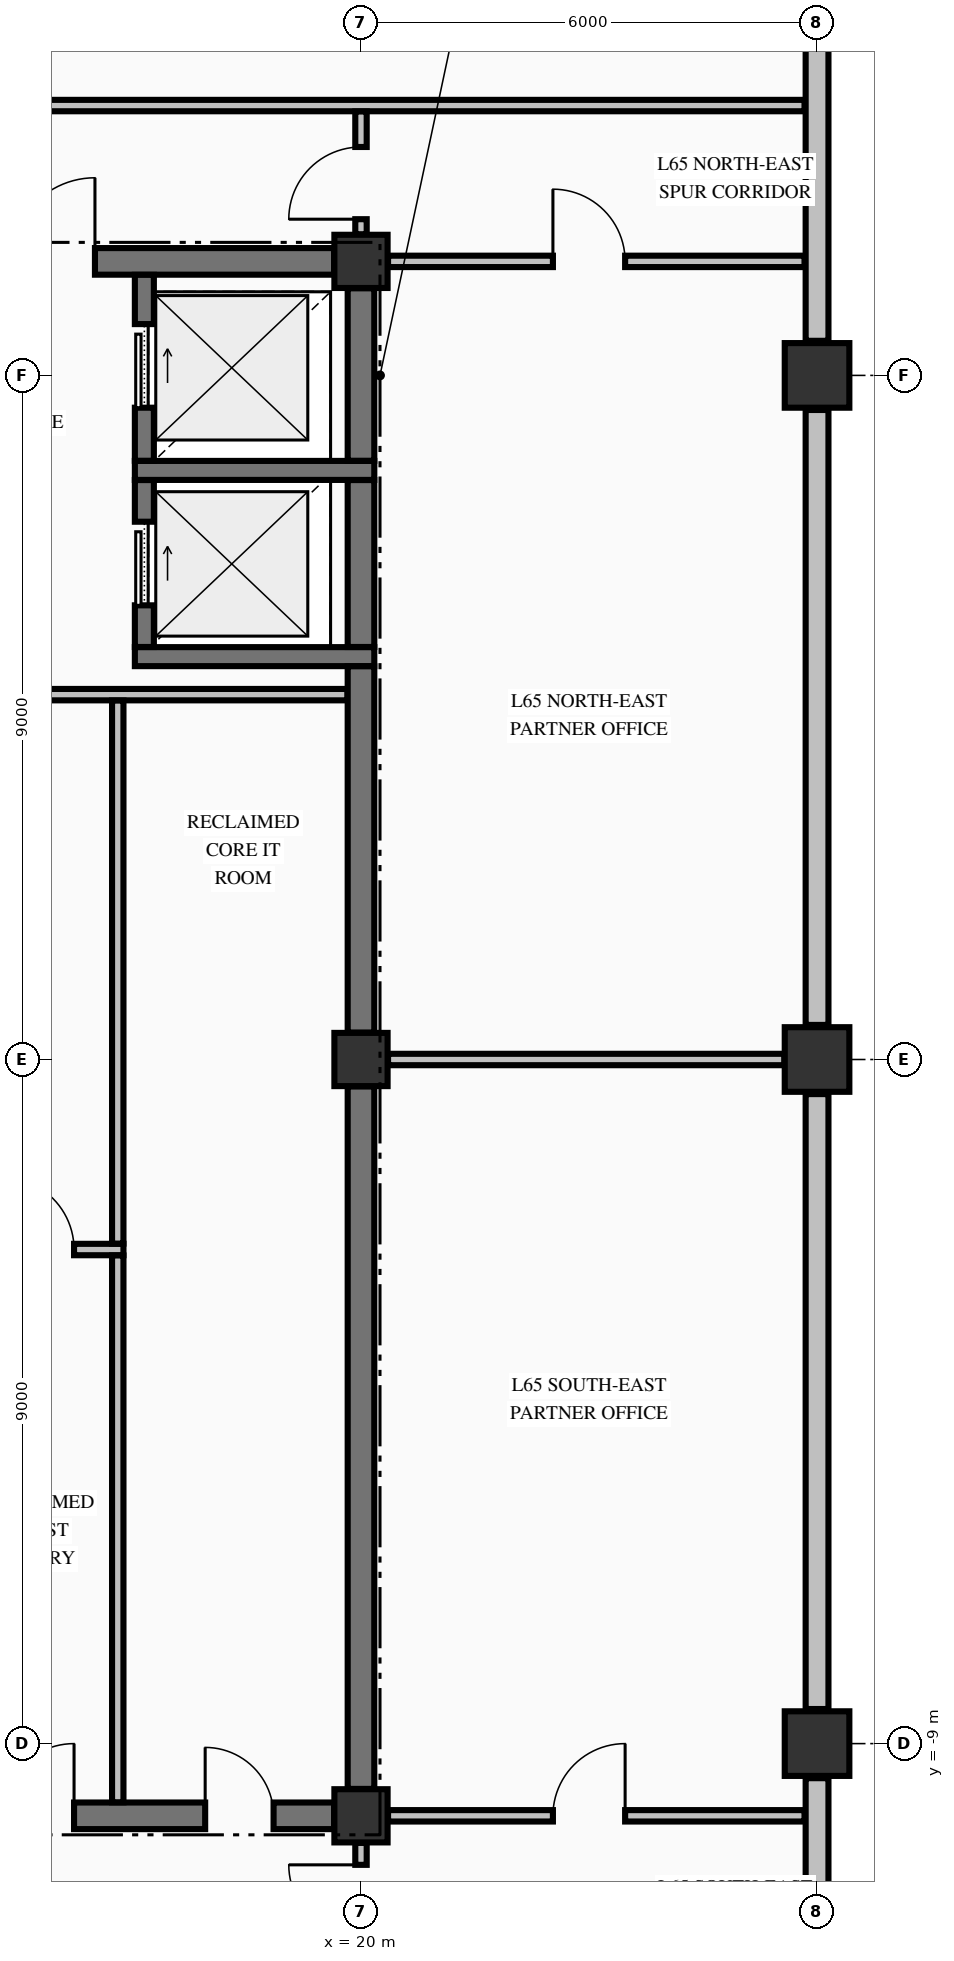
"""IFC4 building model, lengths in metres.
Left out: names, types, materials, properties, quantities, classifications, styles, units other than length and angle.
Written with IfcOpenShell. Run it as: python <this file> out.ifc"""

import sys

from ifc_helpers import new_model, si_unit, direction, frame, frame_2d, origin, origin_2d, place, context, subcontext, project, spatial, rectangle, extrude, element, fill, save


model = new_model("IFC4")
c1 = context("Model", 3, precision=1e-05, world=origin(), true_north=direction((0.0, 1.0)))
c2 = subcontext(c1, "Body", "Model", "MODEL_VIEW")
j1 = project(units=[si_unit("LENGTHUNIT", "METRE"), si_unit("PLANEANGLEUNIT", "RADIAN")], contexts=[c1])
p1 = place(None, origin())
s1 = spatial("IfcSite", under=j1, at=p1, CompositionType="ELEMENT")
p2 = place(p1, origin())
s2 = spatial("IfcBuilding", under=s1, at=p2, CompositionType="ELEMENT")
p3 = place(p2, frame((0.0, 0.0, 246.2)))
s3 = spatial("IfcBuildingStorey", under=s2, at=p3, CompositionType="ELEMENT", Elevation=246.2)
for number, where, z_axis, x_axis in (
    (1, (26.0, -9.0, -0.25), (0.0, 0.0, 1.0), (1.0, 0.0, 0.0)),
    (2, (26.0, 0.0, -0.25), (0.0, 0.0, 1.0), (1.0, 0.0, 0.0)),
    (3, (26.0, 9.0, -0.25), (0.0, 0.0, 1.0), (1.0, 0.0, 0.0)),
):
    element("IfcColumn", number, at=place(p3, frame(where, z_axis=z_axis, x_axis=x_axis)), inside=s3, PredefinedType="COLUMN", context=c2, shape_type="SweptSolid", body=[
        extrude(rectangle(XDim=0.85, YDim=0.85, at=origin_2d()), origin(), (0.0, 0.0, 1.0), 3.055),
    ])
for number, where, z_axis, x_axis in (
    (4, (20.0, -9.95, -0.25), (0.0, 0.0, 1.0), (1.0, 0.0, 0.0)),
    (5, (20.0, 10.5, -0.25), (0.0, 0.0, 1.0), (1.0, 0.0, 0.0)),
    (6, (20.0, 0.0, -0.25), (0.0, 0.0, 1.0), (1.0, 0.0, 0.0)),
):
    element("IfcColumn", number, at=place(p3, frame(where, z_axis=z_axis, x_axis=x_axis)), inside=s3, PredefinedType="COLUMN", context=c2, shape_type="SweptSolid", body=[
        extrude(rectangle(XDim=0.7, YDim=0.7, at=origin_2d()), origin(), (0.0, 0.0, 1.0), 3.055),
    ])
for number, where, z_axis, x_axis in (
    (7, (26.0, -17.545, 0.0), (0.0, 0.0, 1.0), (0.0, 1.0, 0.0)),
    (8, (26.0, -8.545, 0.0), (0.0, 0.0, 1.0), (0.0, 1.0, 0.0)),
    (9, (26.0, 0.455, 0.0), (0.0, 0.0, 1.0), (0.0, 1.0, 0.0)),
    (10, (26.0, 9.455, 0.0), (0.0, 0.0, 1.0), (0.0, 1.0, 0.0)),
):
    element("IfcWall", number, at=place(p3, frame(where, z_axis=z_axis, x_axis=x_axis)), inside=s3, PredefinedType="STANDARD", context=c2, shape_type="SweptSolid", body=[
        extrude(rectangle(XDim=8.09, YDim=0.3, at=frame_2d((4.045, 0.0))), origin(), (0.0, 0.0, 1.0), 2.197),
    ])
p4 = place(p3, frame((14.7, -9.95, 0.0), z_axis=(0.0, 0.0, 1.0), x_axis=(1.0, 0.0, 0.0)))
e11 = element("IfcWall", 11, at=p4, inside=s3, PredefinedType="SHEAR", context=c2, shape_type="SweptSolid", body=[
    extrude(rectangle(XDim=4.946, YDim=0.35, at=frame_2d((2.473, 0.0))), origin(), (0.0, 0.0, 1.0), 2.805),
])
p5 = place(p4, frame((3.25, 0.0, 0.0)))
e12 = element("IfcOpeningElement", 12, at=p5, cuts=e11, PredefinedType="OPENING", context=c2, shape_type="SweptSolid", body=[
    extrude(rectangle(XDim=0.9, YDim=2.15, at=frame_2d((0.45, 1.075))), frame((0.0, 0.185, 0.0), z_axis=(0.0, -1.0, 0.0), x_axis=(1.0, 0.0, 0.0)), (0.0, 0.0, 1.0), 0.37),
])
p6 = place(p4, frame((0.575, 0.0, 0.0)))
e13 = element("IfcOpeningElement", 13, at=p6, cuts=e11, PredefinedType="OPENING", context=c2, shape_type="SweptSolid", body=[
    extrude(rectangle(XDim=0.95, YDim=2.15, at=frame_2d((0.475, 1.075))), frame((0.0, 0.185, 0.0), z_axis=(0.0, -1.0, 0.0), x_axis=(1.0, 0.0, 0.0)), (0.0, 0.0, 1.0), 0.37),
])
for number, where, z_axis, x_axis in (
    (14, (17.025, 5.3, 0.0), (0.0, 0.0, 1.0), (1.0, 0.0, 0.0)),
    (15, (17.025, 7.75, 0.0), (0.0, 0.0, 1.0), (1.0, 0.0, 0.0)),
):
    element("IfcWall", number, at=place(p3, frame(where, z_axis=z_axis, x_axis=x_axis)), inside=s3, PredefinedType="SOLIDWALL", context=c2, shape_type="SweptSolid", body=[
        extrude(rectangle(XDim=3.15, YDim=0.25, at=frame_2d((1.575, 0.0))), origin(), (0.0, 0.0, 1.0), 2.805),
    ])
p7 = place(p3, frame((14.7, 10.5, 0.0), z_axis=(0.0, 0.0, 1.0), x_axis=(1.0, 0.0, 0.0)))
e16 = element("IfcWall", 16, at=p7, inside=s3, PredefinedType="SHEAR", context=c2, shape_type="SweptSolid", body=[
    extrude(rectangle(XDim=4.946, YDim=0.35, at=frame_2d((2.473, 0.0))), origin(), (0.0, 0.0, 1.0), 2.805),
])
p8 = place(p7, frame((0.7, 0.0, 0.0)))
e17 = element("IfcOpeningElement", 17, at=p8, cuts=e16, PredefinedType="OPENING", context=c2, shape_type="SweptSolid", body=[
    extrude(rectangle(XDim=1.1, YDim=2.15, at=frame_2d((0.55, 1.075))), frame((0.0, 0.185, 0.0), z_axis=(0.0, -1.0, 0.0), x_axis=(1.0, 0.0, 0.0)), (0.0, 0.0, 1.0), 0.37),
])
p9 = place(p3, frame((20.356, -9.95, 0.0), z_axis=(0.0, 0.0, 1.0), x_axis=(1.0, 0.0, 0.0)))
e18 = element("IfcWall", 18, at=p9, inside=s3, PredefinedType="PARTITIONING", context=c2, shape_type="SweptSolid", body=[
    extrude(rectangle(XDim=5.479, YDim=0.15, at=frame_2d((2.74, 0.0))), origin(), (0.0, 0.0, 1.0), 2.805),
])
p10 = place(p9, frame((2.169, 0.0, 0.0)))
e19 = element("IfcOpeningElement", 19, at=p10, cuts=e18, PredefinedType="OPENING", context=c2, shape_type="SweptSolid", body=[
    extrude(rectangle(XDim=0.95, YDim=2.15, at=frame_2d((0.475, 1.075))), frame((0.0, 0.085, 0.0), z_axis=(0.0, -1.0, 0.0), x_axis=(1.0, 0.0, 0.0)), (0.0, 0.0, 1.0), 0.17),
])
p11 = place(p3, frame((14.878, -2.5, 0.0), z_axis=(0.0, 0.0, 1.0), x_axis=(1.0, 0.0, 0.0)))
e20 = element("IfcWall", 20, at=p11, inside=s3, PredefinedType="PARTITIONING", context=c2, shape_type="SweptSolid", body=[
    extrude(rectangle(XDim=1.997, YDim=0.15, at=frame_2d((0.999, 0.0))), origin(), (0.0, 0.0, 1.0), 2.805),
])
p12 = place(p11, frame((0.397, 0.0, 0.0)))
e21 = element("IfcOpeningElement", 21, at=p12, cuts=e20, PredefinedType="OPENING", context=c2, shape_type="SweptSolid", body=[
    extrude(rectangle(XDim=0.95, YDim=2.15, at=frame_2d((0.475, 1.075))), frame((0.0, 0.085, 0.0), z_axis=(0.0, -1.0, 0.0), x_axis=(1.0, 0.0, 0.0)), (0.0, 0.0, 1.0), 0.17),
])
p13 = place(p3, frame((20.356, 0.0, 0.0), z_axis=(0.0, 0.0, 1.0), x_axis=(1.0, 0.0, 0.0)))
e22 = element("IfcWall", 22, at=p13, inside=s3, PredefinedType="PARTITIONING", context=c2, shape_type="SweptSolid", body=[
    extrude(rectangle(XDim=5.213, YDim=0.15, at=frame_2d((2.606, 0.0))), origin(), (0.0, 0.0, 1.0), 2.395),
])
p14 = place(p3, frame((14.878, 4.8, 0.0), z_axis=(0.0, 0.0, 1.0), x_axis=(1.0, 0.0, 0.0)))
e23 = element("IfcWall", 23, at=p14, inside=s3, PredefinedType="PARTITIONING", context=c2, shape_type="SweptSolid", body=[
    extrude(rectangle(XDim=4.944, YDim=0.15, at=frame_2d((2.472, 0.0))), origin(), (0.0, 0.0, 1.0), 2.805),
])
p15 = place(p3, frame((20.356, 10.5, 0.0), z_axis=(0.0, 0.0, 1.0), x_axis=(1.0, 0.0, 0.0)))
e24 = element("IfcWall", 24, at=p15, inside=s3, PredefinedType="PARTITIONING", context=c2, shape_type="SweptSolid", body=[
    extrude(rectangle(XDim=5.479, YDim=0.15, at=frame_2d((2.74, 0.0))), origin(), (0.0, 0.0, 1.0), 2.805),
])
p16 = place(p15, frame((2.169, 0.0, 0.0)))
e25 = element("IfcOpeningElement", 25, at=p16, cuts=e24, PredefinedType="OPENING", context=c2, shape_type="SweptSolid", body=[
    extrude(rectangle(XDim=0.95, YDim=2.15, at=frame_2d((0.475, 1.075))), frame((0.0, 0.085, 0.0), z_axis=(0.0, -1.0, 0.0), x_axis=(1.0, 0.0, 0.0)), (0.0, 0.0, 1.0), 0.17),
])
p17 = place(p3, frame((-20.075, 12.55, 0.0), z_axis=(0.0, 0.0, 1.0), x_axis=(1.0, 0.0, 0.0)))
e26 = element("IfcWall", 26, at=p17, inside=s3, PredefinedType="PARTITIONING", context=c2, shape_type="SweptSolid", body=[
    extrude(rectangle(XDim=45.91, YDim=0.15, at=frame_2d((22.955, 0.0))), origin(), (0.0, 0.0, 1.0), 2.805),
])
p18 = place(p17, frame((5.7, 0.0, 0.0)))
e27 = element("IfcOpeningElement", 27, at=p18, cuts=e26, PredefinedType="OPENING", context=c2, shape_type="SweptSolid", body=[
    extrude(rectangle(XDim=1.05, YDim=2.15, at=frame_2d((0.525, 1.075))), frame((0.0, 0.085, 0.0), z_axis=(0.0, -1.0, 0.0), x_axis=(1.0, 0.0, 0.0)), (0.0, 0.0, 1.0), 0.17),
])
p19 = place(p17, frame((26.4, 0.0, 0.0)))
e28 = element("IfcOpeningElement", 28, at=p19, cuts=e26, PredefinedType="OPENING", context=c2, shape_type="SweptSolid", body=[
    extrude(rectangle(XDim=1.05, YDim=2.15, at=frame_2d((0.525, 1.075))), frame((0.0, 0.085, 0.0), z_axis=(0.0, -1.0, 0.0), x_axis=(1.0, 0.0, 0.0)), (0.0, 0.0, 1.0), 0.17),
])
p20 = place(p3, frame((17.15, 5.427, 0.0), z_axis=(0.0, 0.0, 1.0), x_axis=(0.0, 1.0, 0.0)))
e29 = element("IfcWall", 29, at=p20, inside=s3, PredefinedType="SOLIDWALL", context=c2, shape_type="SweptSolid", body=[
    extrude(rectangle(XDim=2.196, YDim=0.25, at=frame_2d((1.098, 0.0))), origin(), (0.0, 0.0, 1.0), 2.805),
])
p21 = place(p20, frame((0.548, 0.0, 0.0)))
e30 = element("IfcOpeningElement", 30, at=p21, cuts=e29, PredefinedType="OPENING", context=c2, shape_type="SweptSolid", body=[
    extrude(rectangle(XDim=1.1, YDim=2.2, at=frame_2d((0.55, 1.1))), frame((0.0, 0.135, 0.0), z_axis=(0.0, -1.0, 0.0), x_axis=(1.0, 0.0, 0.0)), (0.0, 0.0, 1.0), 0.27),
])
p22 = place(p3, frame((17.15, 7.877, 0.0), z_axis=(0.0, 0.0, 1.0), x_axis=(0.0, 1.0, 0.0)))
e31 = element("IfcWall", 31, at=p22, inside=s3, PredefinedType="SOLIDWALL", context=c2, shape_type="SweptSolid", body=[
    extrude(rectangle(XDim=2.446, YDim=0.25, at=frame_2d((1.223, 0.0))), origin(), (0.0, 0.0, 1.0), 2.805),
])
p23 = place(p22, frame((0.698, 0.0, 0.0)))
e32 = element("IfcOpeningElement", 32, at=p23, cuts=e31, PredefinedType="OPENING", context=c2, shape_type="SweptSolid", body=[
    extrude(rectangle(XDim=1.1, YDim=2.2, at=frame_2d((0.55, 1.1))), frame((0.0, 0.135, 0.0), z_axis=(0.0, -1.0, 0.0), x_axis=(1.0, 0.0, 0.0)), (0.0, 0.0, 1.0), 0.27),
])
p24 = place(p3, frame((20.0, -9.596, 0.0), z_axis=(0.0, 0.0, 1.0), x_axis=(0.0, 1.0, 0.0)))
e33 = element("IfcWall", 33, at=p24, inside=s3, PredefinedType="SHEAR", context=c2, shape_type="SweptSolid", body=[
    extrude(rectangle(XDim=9.242, YDim=0.35, at=frame_2d((4.621, 0.0))), origin(), (0.0, 0.0, 1.0), 2.805),
])
p25 = place(p3, frame((20.0, 0.354, 0.0), z_axis=(0.0, 0.0, 1.0), x_axis=(0.0, 1.0, 0.0)))
e34 = element("IfcWall", 34, at=p25, inside=s3, PredefinedType="SHEAR", context=c2, shape_type="SweptSolid", body=[
    extrude(rectangle(XDim=4.819, YDim=0.35, at=frame_2d((2.41, 0.0))), origin(), (0.0, 0.0, 1.0), 2.805),
])
p26 = place(p3, frame((20.0, 5.427, 0.0), z_axis=(0.0, 0.0, 1.0), x_axis=(0.0, 1.0, 0.0)))
e35 = element("IfcWall", 35, at=p26, inside=s3, PredefinedType="SHEAR", context=c2, shape_type="SweptSolid", body=[
    extrude(rectangle(XDim=2.196, YDim=0.35, at=frame_2d((1.098, 0.0))), origin(), (0.0, 0.0, 1.0), 2.805),
])
p27 = place(p3, frame((20.0, 7.877, 0.0), z_axis=(0.0, 0.0, 1.0), x_axis=(0.0, 1.0, 0.0)))
e36 = element("IfcWall", 36, at=p27, inside=s3, PredefinedType="SHEAR", context=c2, shape_type="SweptSolid", body=[
    extrude(rectangle(XDim=2.269, YDim=0.35, at=frame_2d((1.135, 0.0))), origin(), (0.0, 0.0, 1.0), 2.805),
])
p28 = place(p3, frame((16.8, -9.772, 0.0), z_axis=(0.0, 0.0, 1.0), x_axis=(0.0, 1.0, 0.0)))
e37 = element("IfcWall", 37, at=p28, inside=s3, PredefinedType="PARTITIONING", context=c2, shape_type="SweptSolid", body=[
    extrude(rectangle(XDim=7.194, YDim=0.15, at=frame_2d((3.597, 0.0))), origin(), (0.0, 0.0, 1.0), 2.805),
])
p29 = place(p3, frame((16.8, -2.422, 0.0), z_axis=(0.0, 0.0, 1.0), x_axis=(0.0, 1.0, 0.0)))
e38 = element("IfcWall", 38, at=p29, inside=s3, PredefinedType="PARTITIONING", context=c2, shape_type="SweptSolid", body=[
    extrude(rectangle(XDim=7.144, YDim=0.15, at=frame_2d((3.572, 0.0))), origin(), (0.0, 0.0, 1.0), 2.805),
])
p30 = place(p3, frame((20.0, -12.122, 0.0), z_axis=(0.0, 0.0, 1.0), x_axis=(0.0, 1.0, 0.0)))
e39 = element("IfcWall", 39, at=p30, inside=s3, PredefinedType="PARTITIONING", context=c2, shape_type="SweptSolid", body=[
    extrude(rectangle(XDim=1.816, YDim=0.15, at=frame_2d((0.908, 0.0))), origin(), (0.0, 0.0, 1.0), 2.805),
])
p31 = place(p30, frame((0.577, 0.0, 0.0)))
e40 = element("IfcOpeningElement", 40, at=p31, cuts=e39, PredefinedType="OPENING", context=c2, shape_type="SweptSolid", body=[
    extrude(rectangle(XDim=0.95, YDim=2.15, at=frame_2d((0.475, 1.075))), frame((0.0, 0.085, 0.0), z_axis=(0.0, -1.0, 0.0), x_axis=(1.0, 0.0, 0.0)), (0.0, 0.0, 1.0), 0.17),
])
p32 = place(p3, frame((20.0, 10.856, 0.0), z_axis=(0.0, 0.0, 1.0), x_axis=(0.0, 1.0, 0.0)))
e41 = element("IfcWall", 41, at=p32, inside=s3, PredefinedType="PARTITIONING", context=c2, shape_type="SweptSolid", body=[
    extrude(rectangle(XDim=1.616, YDim=0.15, at=frame_2d((0.808, 0.0))), origin(), (0.0, 0.0, 1.0), 2.805),
])
p33 = place(p32, frame((0.199, 0.0, 0.0)))
e42 = element("IfcOpeningElement", 42, at=p33, cuts=e41, PredefinedType="OPENING", context=c2, shape_type="SweptSolid", body=[
    extrude(rectangle(XDim=0.95, YDim=2.15, at=frame_2d((0.475, 1.075))), frame((0.0, 0.085, 0.0), z_axis=(0.0, -1.0, 0.0), x_axis=(1.0, 0.0, 0.0)), (0.0, 0.0, 1.0), 0.17),
])
p34 = place(p21, origin())
e43 = element("IfcDoor", 43, at=p34, inside=s3, OperationType="SLIDING_TO_RIGHT", PredefinedType="DOOR", context=c2, shape_type="SweptSolid", body=[
    extrude(rectangle(XDim=1.1, YDim=2.2, at=frame_2d((0.55, 1.1))), frame((0.0, 0.025, 0.0), z_axis=(0.0, -1.0, 0.0), x_axis=(1.0, 0.0, 0.0)), (0.0, 0.0, 1.0), 0.05),
])
fill(e30, e43)
p35 = place(p23, origin())
e44 = element("IfcDoor", 44, at=p35, inside=s3, OperationType="SLIDING_TO_RIGHT", PredefinedType="DOOR", context=c2, shape_type="SweptSolid", body=[
    extrude(rectangle(XDim=1.1, YDim=2.2, at=frame_2d((0.55, 1.1))), frame((0.0, 0.025, 0.0), z_axis=(0.0, -1.0, 0.0), x_axis=(1.0, 0.0, 0.0)), (0.0, 0.0, 1.0), 0.05),
])
fill(e32, e44)
p36 = place(p8, origin())
e45 = element("IfcDoor", 45, at=p36, inside=s3, OperationType="SINGLE_SWING_RIGHT", PredefinedType="DOOR", context=c2, shape_type="SweptSolid", body=[
    extrude(rectangle(XDim=1.1, YDim=2.15, at=frame_2d((0.55, 1.075))), frame((0.0, 0.025, 0.0), z_axis=(0.0, -1.0, 0.0), x_axis=(1.0, 0.0, 0.0)), (0.0, 0.0, 1.0), 0.05),
])
fill(e17, e45)
p37 = place(p5, origin())
e46 = element("IfcDoor", 46, at=p37, inside=s3, OperationType="SINGLE_SWING_LEFT", PredefinedType="DOOR", context=c2, shape_type="SweptSolid", body=[
    extrude(rectangle(XDim=0.9, YDim=2.15, at=frame_2d((0.45, 1.075))), frame((0.0, 0.025, 0.0), z_axis=(0.0, -1.0, 0.0), x_axis=(1.0, 0.0, 0.0)), (0.0, 0.0, 1.0), 0.05),
])
fill(e12, e46)
p38 = place(p6, origin())
e47 = element("IfcDoor", 47, at=p38, inside=s3, OperationType="SINGLE_SWING_RIGHT", PredefinedType="DOOR", context=c2, shape_type="SweptSolid", body=[
    extrude(rectangle(XDim=0.95, YDim=2.15, at=frame_2d((0.475, 1.075))), frame((0.0, 0.025, 0.0), z_axis=(0.0, -1.0, 0.0), x_axis=(1.0, 0.0, 0.0)), (0.0, 0.0, 1.0), 0.05),
])
fill(e13, e47)
p39 = place(p12, origin())
e48 = element("IfcDoor", 48, at=p39, inside=s3, OperationType="SINGLE_SWING_LEFT", PredefinedType="DOOR", context=c2, shape_type="SweptSolid", body=[
    extrude(rectangle(XDim=0.95, YDim=2.15, at=frame_2d((0.475, 1.075))), frame((0.0, 0.025, 0.0), z_axis=(0.0, -1.0, 0.0), x_axis=(1.0, 0.0, 0.0)), (0.0, 0.0, 1.0), 0.05),
])
fill(e21, e48)
p40 = place(p33, origin())
e49 = element("IfcDoor", 49, at=p40, inside=s3, OperationType="SINGLE_SWING_LEFT", PredefinedType="DOOR", context=c2, shape_type="SweptSolid", body=[
    extrude(rectangle(XDim=0.95, YDim=2.15, at=frame_2d((0.475, 1.075))), frame((0.0, 0.025, 0.0), z_axis=(0.0, -1.0, 0.0), x_axis=(1.0, 0.0, 0.0)), (0.0, 0.0, 1.0), 0.05),
])
fill(e42, e49)
p41 = place(p31, origin())
e50 = element("IfcDoor", 50, at=p41, inside=s3, OperationType="SINGLE_SWING_RIGHT", PredefinedType="DOOR", context=c2, shape_type="SweptSolid", body=[
    extrude(rectangle(XDim=0.95, YDim=2.15, at=frame_2d((0.475, 1.075))), frame((0.0, 0.025, 0.0), z_axis=(0.0, -1.0, 0.0), x_axis=(1.0, 0.0, 0.0)), (0.0, 0.0, 1.0), 0.05),
])
fill(e40, e50)
p42 = place(p16, origin())
e51 = element("IfcDoor", 51, at=p42, inside=s3, OperationType="SINGLE_SWING_LEFT", PredefinedType="DOOR", context=c2, shape_type="SweptSolid", body=[
    extrude(rectangle(XDim=0.95, YDim=2.15, at=frame_2d((0.475, 1.075))), frame((0.0, 0.025, 0.0), z_axis=(0.0, -1.0, 0.0), x_axis=(1.0, 0.0, 0.0)), (0.0, 0.0, 1.0), 0.05),
])
fill(e25, e51)
p43 = place(p10, origin())
e52 = element("IfcDoor", 52, at=p43, inside=s3, OperationType="SINGLE_SWING_RIGHT", PredefinedType="DOOR", context=c2, shape_type="SweptSolid", body=[
    extrude(rectangle(XDim=0.95, YDim=2.15, at=frame_2d((0.475, 1.075))), frame((0.0, 0.025, 0.0), z_axis=(0.0, -1.0, 0.0), x_axis=(1.0, 0.0, 0.0)), (0.0, 0.0, 1.0), 0.05),
])
fill(e19, e52)
save(model, sys.argv[1])
